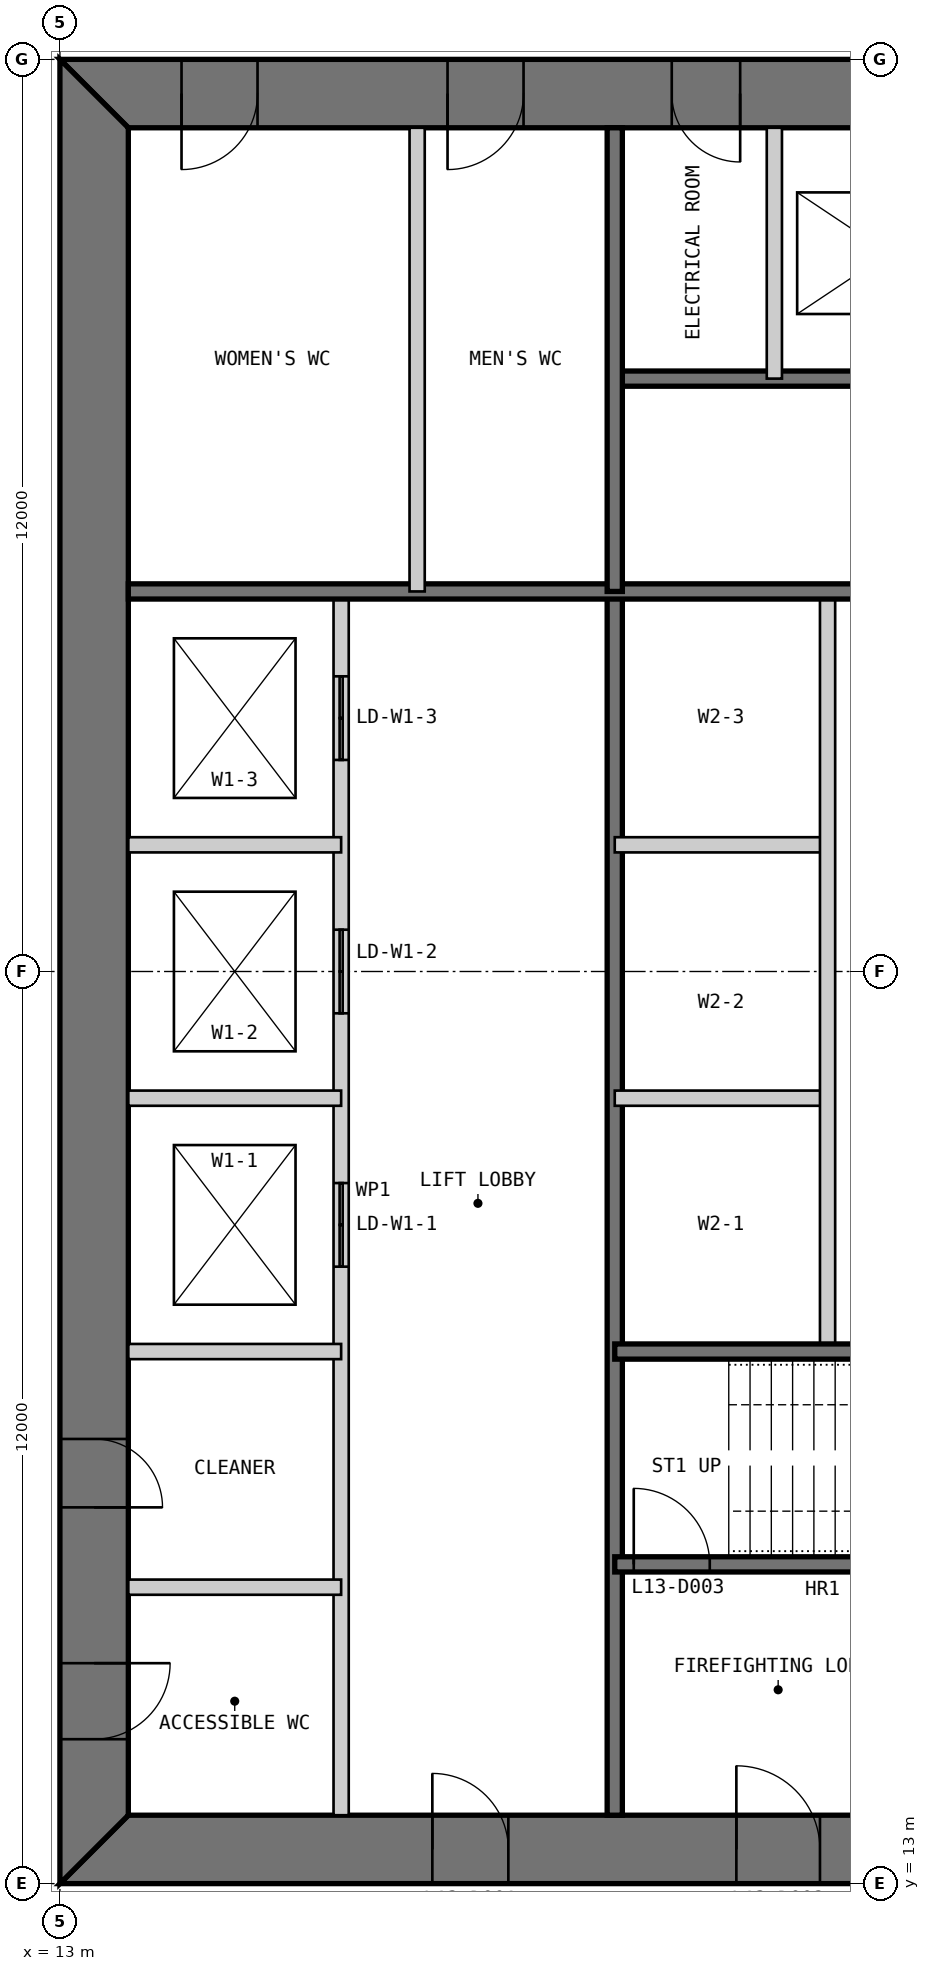
"""IFC4 building model, lengths in metres.
Left out: names, types, materials, properties, quantities, classifications, styles, units other than length and angle.
Written with IfcOpenShell. Run it as: python <this file> out.ifc"""

import sys

from ifc_helpers import new_model, si_unit, direction, frame, frame_2d, origin, place, context, subcontext, project, spatial, polyline, rectangle, outline, extrude, element, fill, save


model = new_model("IFC4")
c1 = context("Model", 3, precision=1e-05, world=origin(), true_north=direction((0.0, 1.0)))
c2 = subcontext(c1, "Body", "Model", "MODEL_VIEW")
j1 = project(units=[si_unit("LENGTHUNIT", "METRE"), si_unit("PLANEANGLEUNIT", "RADIAN")], contexts=[c1])
p1 = place(None, origin())
s1 = spatial("IfcSite", under=j1, at=p1, CompositionType="ELEMENT")
p2 = place(p1, origin())
s2 = spatial("IfcBuilding", under=s1, at=p2, CompositionType="ELEMENT")
p3 = place(p2, frame((0.0, 0.0, 59.0)))
s3 = spatial("IfcBuildingStorey", under=s2, at=p3, CompositionType="ELEMENT", Elevation=59.0)
p4 = place(p3, frame((13.0, 13.45, 0.0), z_axis=(0.0, 0.0, 1.0), x_axis=(1.0, 0.0, 0.0)))
e1 = element("IfcWall", 1, at=p4, inside=s3, PredefinedType="SHEAR", context=c2, shape_type="SweptSolid", body=[
    extrude(outline(polyline([(0.0, -0.45), (24.0, -0.45), (23.1, 0.45), (0.9, 0.45), (0.0, -0.45)])), origin(), (0.0, 0.0, 1.0), 4.0),
])
p5 = place(p4, frame((4.9, 0.0, 0.0)))
e2 = element("IfcOpeningElement", 2, at=p5, cuts=e1, PredefinedType="OPENING", context=c2, shape_type="SweptSolid", body=[
    extrude(rectangle(XDim=1.0, YDim=2.2, at=frame_2d((0.5, 1.1))), frame((0.0, 0.46, 0.0), z_axis=(0.0, -1.0, 0.0), x_axis=(1.0, 0.0, 0.0)), (0.0, 0.0, 1.0), 0.92),
])
p6 = place(p4, frame((8.9, 0.0, 0.0)))
e3 = element("IfcOpeningElement", 3, at=p6, cuts=e1, PredefinedType="OPENING", context=c2, shape_type="SweptSolid", body=[
    extrude(rectangle(XDim=1.1, YDim=2.2, at=frame_2d((0.55, 1.1))), frame((0.0, 0.46, 0.0), z_axis=(0.0, -1.0, 0.0), x_axis=(1.0, 0.0, 0.0)), (0.0, 0.0, 1.0), 0.92),
])
p7 = place(p4, frame((15.05, 0.0, 0.0)))
e4 = element("IfcOpeningElement", 4, at=p7, cuts=e1, PredefinedType="OPENING", context=c2, shape_type="SweptSolid", body=[
    extrude(rectangle(XDim=0.9, YDim=2.2, at=frame_2d((0.45, 1.1))), frame((0.0, 0.46, 0.0), z_axis=(0.0, -1.0, 0.0), x_axis=(1.0, 0.0, 0.0)), (0.0, 0.0, 1.0), 0.92),
])
p8 = place(p4, frame((17.9, 0.0, 0.0)))
e5 = element("IfcOpeningElement", 5, at=p8, cuts=e1, PredefinedType="OPENING", context=c2, shape_type="SweptSolid", body=[
    extrude(rectangle(XDim=1.0, YDim=2.2, at=frame_2d((0.5, 1.1))), frame((0.0, 0.46, 0.0), z_axis=(0.0, -1.0, 0.0), x_axis=(1.0, 0.0, 0.0)), (0.0, 0.0, 1.0), 0.92),
])
p9 = place(p4, frame((21.4, 0.0, 0.0)))
e6 = element("IfcOpeningElement", 6, at=p9, cuts=e1, PredefinedType="OPENING", context=c2, shape_type="SweptSolid", body=[
    extrude(rectangle(XDim=1.0, YDim=2.2, at=frame_2d((0.5, 1.1))), frame((0.0, 0.46, 0.0), z_axis=(0.0, -1.0, 0.0), x_axis=(1.0, 0.0, 0.0)), (0.0, 0.0, 1.0), 0.92),
])
p10 = place(p3, frame((37.0, 36.55, 0.0), z_axis=(0.0, 0.0, 1.0), x_axis=(-1.0, 0.0, 0.0)))
e7 = element("IfcWall", 7, at=p10, inside=s3, PredefinedType="SHEAR", context=c2, shape_type="SweptSolid", body=[
    extrude(outline(polyline([(0.0, -0.45), (24.0, -0.45), (23.1, 0.45), (0.9, 0.45), (0.0, -0.45)])), origin(), (0.0, 0.0, 1.0), 4.0),
])
p11 = place(p10, frame((4.9, 0.0, 0.0)))
e8 = element("IfcOpeningElement", 8, at=p11, cuts=e7, PredefinedType="OPENING", context=c2, shape_type="SweptSolid", body=[
    extrude(rectangle(XDim=1.0, YDim=2.2, at=frame_2d((0.5, 1.1))), frame((0.0, 0.46, 0.0), z_axis=(0.0, -1.0, 0.0), x_axis=(1.0, 0.0, 0.0)), (0.0, 0.0, 1.0), 0.92),
])
p12 = place(p10, frame((8.9, 0.0, 0.0)))
e9 = element("IfcOpeningElement", 9, at=p12, cuts=e7, PredefinedType="OPENING", context=c2, shape_type="SweptSolid", body=[
    extrude(rectangle(XDim=1.1, YDim=2.2, at=frame_2d((0.55, 1.1))), frame((0.0, 0.46, 0.0), z_axis=(0.0, -1.0, 0.0), x_axis=(1.0, 0.0, 0.0)), (0.0, 0.0, 1.0), 0.92),
])
p13 = place(p10, frame((15.05, 0.0, 0.0)))
e10 = element("IfcOpeningElement", 10, at=p13, cuts=e7, PredefinedType="OPENING", context=c2, shape_type="SweptSolid", body=[
    extrude(rectangle(XDim=0.9, YDim=2.2, at=frame_2d((0.45, 1.1))), frame((0.0, 0.46, 0.0), z_axis=(0.0, -1.0, 0.0), x_axis=(1.0, 0.0, 0.0)), (0.0, 0.0, 1.0), 0.92),
])
p14 = place(p10, frame((17.9, 0.0, 0.0)))
e11 = element("IfcOpeningElement", 11, at=p14, cuts=e7, PredefinedType="OPENING", context=c2, shape_type="SweptSolid", body=[
    extrude(rectangle(XDim=1.0, YDim=2.2, at=frame_2d((0.5, 1.1))), frame((0.0, 0.46, 0.0), z_axis=(0.0, -1.0, 0.0), x_axis=(1.0, 0.0, 0.0)), (0.0, 0.0, 1.0), 0.92),
])
p15 = place(p10, frame((21.4, 0.0, 0.0)))
e12 = element("IfcOpeningElement", 12, at=p15, cuts=e7, PredefinedType="OPENING", context=c2, shape_type="SweptSolid", body=[
    extrude(rectangle(XDim=1.0, YDim=2.2, at=frame_2d((0.5, 1.1))), frame((0.0, 0.46, 0.0), z_axis=(0.0, -1.0, 0.0), x_axis=(1.0, 0.0, 0.0)), (0.0, 0.0, 1.0), 0.92),
])
p16 = place(p3, frame((13.45, 36.1, 0.0), z_axis=(0.0, 0.0, 1.0), x_axis=(0.0, -1.0, 0.0)))
e13 = element("IfcWall", 13, at=p16, inside=s3, PredefinedType="SHEAR", context=c2, shape_type="SweptSolid", body=[
    extrude(outline(polyline([(-0.9, -0.45), (23.1, -0.45), (22.2, 0.45), (0.0, 0.45), (-0.9, -0.45)])), origin(), (0.0, 0.0, 1.0), 4.0),
])
p17 = place(p16, frame((20.2, 0.0, 0.0)))
e14 = element("IfcOpeningElement", 14, at=p17, cuts=e13, PredefinedType="OPENING", context=c2, shape_type="SweptSolid", body=[
    extrude(rectangle(XDim=1.0, YDim=2.2, at=frame_2d((0.5, 1.1))), frame((0.0, 0.46, 0.0), z_axis=(0.0, -1.0, 0.0), x_axis=(1.0, 0.0, 0.0)), (0.0, 0.0, 1.0), 0.92),
])
p18 = place(p16, frame((17.25, 0.0, 0.0)))
e15 = element("IfcOpeningElement", 15, at=p18, cuts=e13, PredefinedType="OPENING", context=c2, shape_type="SweptSolid", body=[
    extrude(rectangle(XDim=0.9, YDim=2.2, at=frame_2d((0.45, 1.1))), frame((0.0, 0.46, 0.0), z_axis=(0.0, -1.0, 0.0), x_axis=(1.0, 0.0, 0.0)), (0.0, 0.0, 1.0), 0.92),
])
p19 = place(p3, frame((16.7, 13.9, 0.0), z_axis=(0.0, 0.0, 1.0), x_axis=(0.0, 1.0, 0.0)))
e16 = element("IfcWall", 16, at=p19, inside=s3, PredefinedType="PARTITIONING", context=c2, shape_type="SweptSolid", body=[
    extrude(rectangle(XDim=16.1, YDim=0.2, at=frame_2d((8.05, 0.0))), origin(), (0.0, 0.0, 1.0), 3.8),
])
p20 = place(p19, frame((7.217, 0.0, 0.0)))
e17 = element("IfcOpeningElement", 17, at=p20, cuts=e16, PredefinedType="OPENING", context=c2, shape_type="SweptSolid", body=[
    extrude(rectangle(XDim=1.1, YDim=2.2, at=frame_2d((0.55, 1.1))), frame((0.0, 0.11, 0.0), z_axis=(0.0, -1.0, 0.0), x_axis=(1.0, 0.0, 0.0)), (0.0, 0.0, 1.0), 0.22),
])
p21 = place(p19, frame((10.55, 0.0, 0.0)))
e18 = element("IfcOpeningElement", 18, at=p21, cuts=e16, PredefinedType="OPENING", context=c2, shape_type="SweptSolid", body=[
    extrude(rectangle(XDim=1.1, YDim=2.2, at=frame_2d((0.55, 1.1))), frame((0.0, 0.11, 0.0), z_axis=(0.0, -1.0, 0.0), x_axis=(1.0, 0.0, 0.0)), (0.0, 0.0, 1.0), 0.22),
])
p22 = place(p19, frame((13.883, 0.0, 0.0)))
e19 = element("IfcOpeningElement", 19, at=p22, cuts=e16, PredefinedType="OPENING", context=c2, shape_type="SweptSolid", body=[
    extrude(rectangle(XDim=1.1, YDim=2.2, at=frame_2d((0.55, 1.1))), frame((0.0, 0.11, 0.0), z_axis=(0.0, -1.0, 0.0), x_axis=(1.0, 0.0, 0.0)), (0.0, 0.0, 1.0), 0.22),
])
p23 = place(p3, frame((20.3, 13.9, 0.0), z_axis=(0.0, 0.0, 1.0), x_axis=(0.0, 1.0, 0.0)))
e20 = element("IfcWall", 20, at=p23, inside=s3, PredefinedType="SOLIDWALL", context=c2, shape_type="SweptSolid", body=[
    extrude(rectangle(XDim=16.1, YDim=0.2, at=frame_2d((8.05, 0.0))), origin(), (0.0, 0.0, 1.0), 3.8),
])
for number, where, z_axis, x_axis in (
    (21, (13.9, 20.0, 0.0), (0.0, 0.0, 1.0), (1.0, 0.0, 0.0)),
    (22, (13.9, 23.333, 0.0), (0.0, 0.0, 1.0), (1.0, 0.0, 0.0)),
    (23, (13.9, 26.667, 0.0), (0.0, 0.0, 1.0), (1.0, 0.0, 0.0)),
    (24, (20.3, 23.333, 0.0), (0.0, 0.0, 1.0), (1.0, 0.0, 0.0)),
    (25, (20.3, 26.667, 0.0), (0.0, 0.0, 1.0), (1.0, 0.0, 0.0)),
):
    element("IfcWall", number, at=place(p3, frame(where, z_axis=z_axis, x_axis=x_axis)), inside=s3, PredefinedType="PARTITIONING", context=c2, shape_type="SweptSolid", body=[
        extrude(rectangle(XDim=2.8, YDim=0.2, at=frame_2d((1.4, 0.0))), origin(), (0.0, 0.0, 1.0), 3.8),
    ])
p24 = place(p3, frame((23.1, 20.0, 0.0), z_axis=(0.0, 0.0, 1.0), x_axis=(0.0, 1.0, 0.0)))
e26 = element("IfcWall", 26, at=p24, inside=s3, PredefinedType="PARTITIONING", context=c2, shape_type="SweptSolid", body=[
    extrude(rectangle(XDim=10.0, YDim=0.2, at=frame_2d((5.0, 0.0))), origin(), (0.0, 0.0, 1.0), 3.8),
])
p25 = place(p3, frame((20.3, 17.2, 0.0), z_axis=(0.0, 0.0, 1.0), x_axis=(1.0, 0.0, 0.0)))
e27 = element("IfcWall", 27, at=p25, inside=s3, PredefinedType="SOLIDWALL", context=c2, shape_type="SweptSolid", body=[
    extrude(rectangle(XDim=9.4, YDim=0.2, at=frame_2d((4.7, 0.0))), origin(), (0.0, 0.0, 1.0), 3.8),
])
p26 = place(p25, frame((0.25, 0.0, 0.0)))
e28 = element("IfcOpeningElement", 28, at=p26, cuts=e27, PredefinedType="OPENING", context=c2, shape_type="SweptSolid", body=[
    extrude(rectangle(XDim=1.0, YDim=2.2, at=frame_2d((0.5, 1.1))), frame((0.0, 0.11, 0.0), z_axis=(0.0, -1.0, 0.0), x_axis=(1.0, 0.0, 0.0)), (0.0, 0.0, 1.0), 0.22),
])
p27 = place(p3, frame((20.3, 20.0, 0.0), z_axis=(0.0, 0.0, 1.0), x_axis=(1.0, 0.0, 0.0)))
e29 = element("IfcWall", 29, at=p27, inside=s3, PredefinedType="SOLIDWALL", context=c2, shape_type="SweptSolid", body=[
    extrude(rectangle(XDim=15.8, YDim=0.2, at=frame_2d((7.9, 0.0))), origin(), (0.0, 0.0, 1.0), 3.8),
])
p28 = place(p3, frame((13.9, 16.9, 0.0), z_axis=(0.0, 0.0, 1.0), x_axis=(1.0, 0.0, 0.0)))
e30 = element("IfcWall", 30, at=p28, inside=s3, PredefinedType="PARTITIONING", context=c2, shape_type="SweptSolid", body=[
    extrude(rectangle(XDim=2.8, YDim=0.2, at=frame_2d((1.4, 0.0))), origin(), (0.0, 0.0, 1.0), 3.8),
])
p29 = place(p3, frame((29.7, 32.8, 0.0), z_axis=(0.0, 0.0, 1.0), x_axis=(-1.0, 0.0, 0.0)))
e31 = element("IfcWall", 31, at=p29, inside=s3, PredefinedType="SOLIDWALL", context=c2, shape_type="SweptSolid", body=[
    extrude(rectangle(XDim=9.4, YDim=0.2, at=frame_2d((4.7, 0.0))), origin(), (0.0, 0.0, 1.0), 3.8),
])
p30 = place(p29, frame((0.25, 0.0, 0.0)))
e32 = element("IfcOpeningElement", 32, at=p30, cuts=e31, PredefinedType="OPENING", context=c2, shape_type="SweptSolid", body=[
    extrude(rectangle(XDim=1.0, YDim=2.2, at=frame_2d((0.5, 1.1))), frame((0.0, 0.11, 0.0), z_axis=(0.0, -1.0, 0.0), x_axis=(1.0, 0.0, 0.0)), (0.0, 0.0, 1.0), 0.22),
])
p31 = place(p3, frame((29.7, 30.0, 0.0), z_axis=(0.0, 0.0, 1.0), x_axis=(-1.0, 0.0, 0.0)))
e33 = element("IfcWall", 33, at=p31, inside=s3, PredefinedType="SOLIDWALL", context=c2, shape_type="SweptSolid", body=[
    extrude(rectangle(XDim=15.8, YDim=0.2, at=frame_2d((7.9, 0.0))), origin(), (0.0, 0.0, 1.0), 3.8),
])
p32 = place(p3, frame((22.4, 36.1, 0.0), z_axis=(0.0, 0.0, 1.0), x_axis=(0.0, -1.0, 0.0)))
e34 = element("IfcWall", 34, at=p32, inside=s3, PredefinedType="PARTITIONING", context=c2, shape_type="SweptSolid", body=[
    extrude(rectangle(XDim=3.3, YDim=0.2, at=frame_2d((1.65, 0.0))), origin(), (0.0, 0.0, 1.0), 3.8),
])
p33 = place(p3, frame((20.3, 36.1, 0.0), z_axis=(0.0, 0.0, 1.0), x_axis=(0.0, -1.0, 0.0)))
e35 = element("IfcWall", 35, at=p33, inside=s3, PredefinedType="SOLIDWALL", context=c2, shape_type="SweptSolid", body=[
    extrude(rectangle(XDim=6.1, YDim=0.2, at=frame_2d((3.05, 0.0))), origin(), (0.0, 0.0, 1.0), 3.8),
])
p34 = place(p3, frame((17.7, 36.1, 0.0), z_axis=(0.0, 0.0, 1.0), x_axis=(0.0, -1.0, 0.0)))
e36 = element("IfcWall", 36, at=p34, inside=s3, PredefinedType="PARTITIONING", context=c2, shape_type="SweptSolid", body=[
    extrude(rectangle(XDim=6.1, YDim=0.2, at=frame_2d((3.05, 0.0))), origin(), (0.0, 0.0, 1.0), 3.8),
])
p35 = place(p5, origin())
e37 = element("IfcDoor", 37, at=p35, inside=s3, OperationType="SINGLE_SWING_LEFT", PredefinedType="DOOR", context=c2, shape_type="SweptSolid", body=[
    extrude(rectangle(XDim=1.0, YDim=2.2, at=frame_2d((0.5, 1.1))), frame((0.0, 0.025, 0.0), z_axis=(0.0, -1.0, 0.0), x_axis=(1.0, 0.0, 0.0)), (0.0, 0.0, 1.0), 0.05),
    extrude(outline(polyline([(0.0, 0.0), (0.04, 0.0), (0.04, 2.16), (0.96, 2.16), (0.96, 0.0), (1.0, 0.0), (1.0, 2.2), (0.0, 2.2), (0.0, 0.0)])), frame((0.0, 0.3, 0.0), z_axis=(0.0, -1.0, 0.0), x_axis=(1.0, 0.0, 0.0)), (0.0, 0.0, 1.0), 0.6),
])
fill(e2, e37)
p36 = place(p6, origin())
e38 = element("IfcDoor", 38, at=p36, inside=s3, OperationType="SINGLE_SWING_LEFT", PredefinedType="DOOR", context=c2, shape_type="SweptSolid", body=[
    extrude(rectangle(XDim=1.1, YDim=2.2, at=frame_2d((0.55, 1.1))), frame((0.0, 0.025, 0.0), z_axis=(0.0, -1.0, 0.0), x_axis=(1.0, 0.0, 0.0)), (0.0, 0.0, 1.0), 0.05),
    extrude(outline(polyline([(0.0, 0.0), (0.04, 0.0), (0.04, 2.16), (1.06, 2.16), (1.06, 0.0), (1.1, 0.0), (1.1, 2.2), (0.0, 2.2), (0.0, 0.0)])), frame((0.0, 0.3, 0.0), z_axis=(0.0, -1.0, 0.0), x_axis=(1.0, 0.0, 0.0)), (0.0, 0.0, 1.0), 0.6),
])
fill(e3, e38)
p37 = place(p26, origin())
e39 = element("IfcDoor", 39, at=p37, inside=s3, OperationType="SINGLE_SWING_LEFT", PredefinedType="DOOR", context=c2, shape_type="SweptSolid", body=[
    extrude(rectangle(XDim=1.0, YDim=2.2, at=frame_2d((0.5, 1.1))), frame((0.0, 0.025, 0.0), z_axis=(0.0, -1.0, 0.0), x_axis=(1.0, 0.0, 0.0)), (0.0, 0.0, 1.0), 0.05),
])
fill(e28, e39)
p38 = place(p17, origin())
e40 = element("IfcDoor", 40, at=p38, inside=s3, OperationType="SINGLE_SWING_LEFT", PredefinedType="DOOR", context=c2, shape_type="SweptSolid", body=[
    extrude(rectangle(XDim=1.0, YDim=2.2, at=frame_2d((0.5, 1.1))), frame((0.0, 0.025, 0.0), z_axis=(0.0, -1.0, 0.0), x_axis=(1.0, 0.0, 0.0)), (0.0, 0.0, 1.0), 0.05),
    extrude(outline(polyline([(0.0, 0.0), (0.04, 0.0), (0.04, 2.16), (0.96, 2.16), (0.96, 0.0), (1.0, 0.0), (1.0, 2.2), (0.0, 2.2), (0.0, 0.0)])), frame((0.0, 0.3, 0.0), z_axis=(0.0, -1.0, 0.0), x_axis=(1.0, 0.0, 0.0)), (0.0, 0.0, 1.0), 0.6),
])
fill(e14, e40)
p39 = place(p18, origin())
e41 = element("IfcDoor", 41, at=p39, inside=s3, OperationType="SINGLE_SWING_RIGHT", PredefinedType="DOOR", context=c2, shape_type="SweptSolid", body=[
    extrude(rectangle(XDim=0.9, YDim=2.2, at=frame_2d((0.45, 1.1))), frame((0.0, 0.025, 0.0), z_axis=(0.0, -1.0, 0.0), x_axis=(1.0, 0.0, 0.0)), (0.0, 0.0, 1.0), 0.05),
    extrude(outline(polyline([(0.0, 0.0), (0.04, 0.0), (0.04, 2.16), (0.86, 2.16), (0.86, 0.0), (0.9, 0.0), (0.9, 2.2), (0.0, 2.2), (0.0, 0.0)])), frame((0.0, 0.3, 0.0), z_axis=(0.0, -1.0, 0.0), x_axis=(1.0, 0.0, 0.0)), (0.0, 0.0, 1.0), 0.6),
])
fill(e15, e41)
p40 = place(p13, origin())
e42 = element("IfcDoor", 42, at=p40, inside=s3, OperationType="SINGLE_SWING_LEFT", PredefinedType="DOOR", context=c2, shape_type="SweptSolid", body=[
    extrude(rectangle(XDim=0.9, YDim=2.2, at=frame_2d((0.45, 1.1))), frame((0.0, 0.025, 0.0), z_axis=(0.0, -1.0, 0.0), x_axis=(1.0, 0.0, 0.0)), (0.0, 0.0, 1.0), 0.05),
    extrude(outline(polyline([(0.0, 0.0), (0.04, 0.0), (0.04, 2.16), (0.86, 2.16), (0.86, 0.0), (0.9, 0.0), (0.9, 2.2), (0.0, 2.2), (0.0, 0.0)])), frame((0.0, 0.3, 0.0), z_axis=(0.0, -1.0, 0.0), x_axis=(1.0, 0.0, 0.0)), (0.0, 0.0, 1.0), 0.6),
])
fill(e10, e42)
p41 = place(p14, origin())
e43 = element("IfcDoor", 43, at=p41, inside=s3, OperationType="SINGLE_SWING_RIGHT", PredefinedType="DOOR", context=c2, shape_type="SweptSolid", body=[
    extrude(rectangle(XDim=1.0, YDim=2.2, at=frame_2d((0.5, 1.1))), frame((0.0, 0.025, 0.0), z_axis=(0.0, -1.0, 0.0), x_axis=(1.0, 0.0, 0.0)), (0.0, 0.0, 1.0), 0.05),
    extrude(outline(polyline([(0.0, 0.0), (0.04, 0.0), (0.04, 2.16), (0.96, 2.16), (0.96, 0.0), (1.0, 0.0), (1.0, 2.2), (0.0, 2.2), (0.0, 0.0)])), frame((0.0, 0.3, 0.0), z_axis=(0.0, -1.0, 0.0), x_axis=(1.0, 0.0, 0.0)), (0.0, 0.0, 1.0), 0.6),
])
fill(e11, e43)
p42 = place(p15, origin())
e44 = element("IfcDoor", 44, at=p42, inside=s3, OperationType="SINGLE_SWING_RIGHT", PredefinedType="DOOR", context=c2, shape_type="SweptSolid", body=[
    extrude(rectangle(XDim=1.0, YDim=2.2, at=frame_2d((0.5, 1.1))), frame((0.0, 0.025, 0.0), z_axis=(0.0, -1.0, 0.0), x_axis=(1.0, 0.0, 0.0)), (0.0, 0.0, 1.0), 0.05),
    extrude(outline(polyline([(0.0, 0.0), (0.04, 0.0), (0.04, 2.16), (0.96, 2.16), (0.96, 0.0), (1.0, 0.0), (1.0, 2.2), (0.0, 2.2), (0.0, 0.0)])), frame((0.0, 0.3, 0.0), z_axis=(0.0, -1.0, 0.0), x_axis=(1.0, 0.0, 0.0)), (0.0, 0.0, 1.0), 0.6),
])
fill(e12, e44)
p43 = place(p20, origin())
e45 = element("IfcDoor", 45, at=p43, inside=s3, OperationType="DOUBLE_DOOR_SLIDING", PredefinedType="DOOR", context=c2, shape_type="SweptSolid", body=[
    extrude(rectangle(XDim=1.1, YDim=2.2, at=frame_2d((0.55, 1.1))), frame((0.0, 0.025, 0.0), z_axis=(0.0, -1.0, 0.0), x_axis=(1.0, 0.0, 0.0)), (0.0, 0.0, 1.0), 0.05),
])
fill(e17, e45)
p44 = place(p21, origin())
e46 = element("IfcDoor", 46, at=p44, inside=s3, OperationType="DOUBLE_DOOR_SLIDING", PredefinedType="DOOR", context=c2, shape_type="SweptSolid", body=[
    extrude(rectangle(XDim=1.1, YDim=2.2, at=frame_2d((0.55, 1.1))), frame((0.0, 0.025, 0.0), z_axis=(0.0, -1.0, 0.0), x_axis=(1.0, 0.0, 0.0)), (0.0, 0.0, 1.0), 0.05),
])
fill(e18, e46)
p45 = place(p22, origin())
e47 = element("IfcDoor", 47, at=p45, inside=s3, OperationType="DOUBLE_DOOR_SLIDING", PredefinedType="DOOR", context=c2, shape_type="SweptSolid", body=[
    extrude(rectangle(XDim=1.1, YDim=2.2, at=frame_2d((0.55, 1.1))), frame((0.0, 0.025, 0.0), z_axis=(0.0, -1.0, 0.0), x_axis=(1.0, 0.0, 0.0)), (0.0, 0.0, 1.0), 0.05),
])
fill(e19, e47)
save(model, sys.argv[1])
